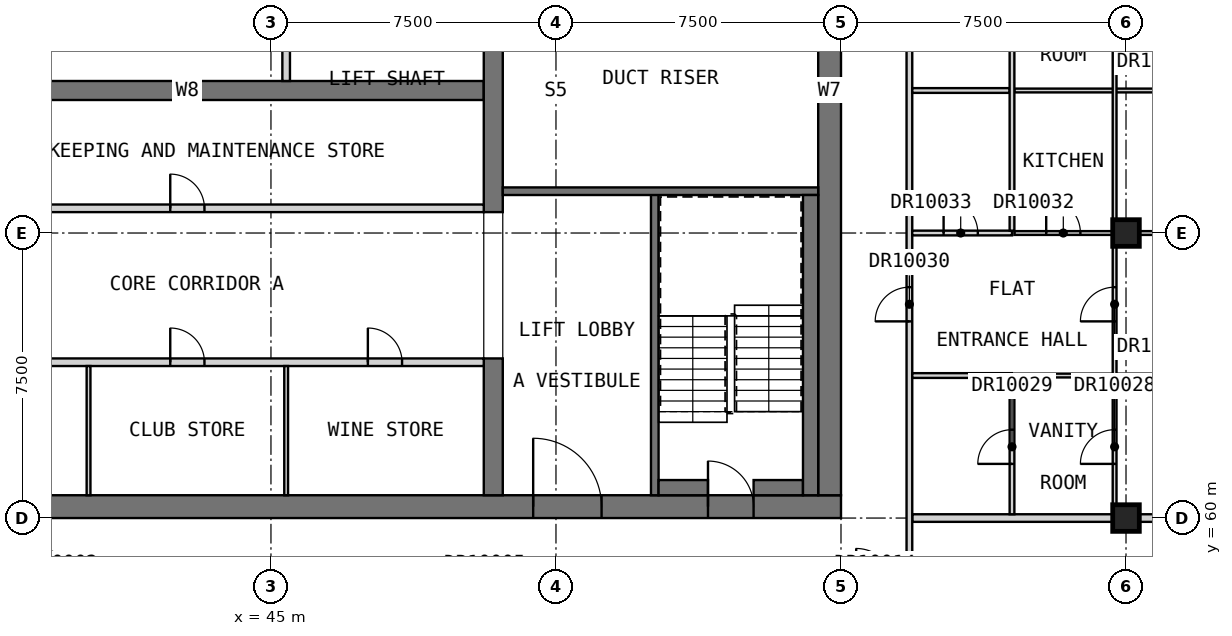
"""IFC4 building model, lengths in metres.
Left out: names, types, materials, properties, quantities, classifications, styles, units other than length and angle.
Written with IfcOpenShell. Run it as: python <this file> out.ifc"""

import sys

from ifc_helpers import new_model, si_unit, direction, frame, frame_2d, origin, origin_2d, place, context, subcontext, project, spatial, rectangle, extrude, element, fill, save


model = new_model("IFC4")
c1 = context("Model", 3, precision=1e-05, world=origin(), true_north=direction((0.0, 1.0)))
c2 = subcontext(c1, "Body", "Model", "MODEL_VIEW")
j1 = project(units=[si_unit("LENGTHUNIT", "METRE"), si_unit("PLANEANGLEUNIT", "RADIAN")], contexts=[c1])
p1 = place(None, origin())
s1 = spatial("IfcSite", under=j1, at=p1, CompositionType="ELEMENT")
p2 = place(p1, origin())
s2 = spatial("IfcBuilding", under=s1, at=p2, CompositionType="ELEMENT")
p3 = place(p2, frame((0.0, 0.0, 283.7)))
s3 = spatial("IfcBuildingStorey", under=s2, at=p3, CompositionType="ELEMENT", Elevation=283.7)
for number, where, z_axis, x_axis in (
    (1, (67.5, 60.0, 0.0), (0.0, 0.0, 1.0), (1.0, 0.0, 0.0)),
    (2, (67.5, 67.5, 0.0), (0.0, 0.0, 1.0), (1.0, 0.0, 0.0)),
):
    element("IfcColumn", number, at=place(p3, frame(where, z_axis=z_axis, x_axis=x_axis)), inside=s3, PredefinedType="COLUMN", context=c2, shape_type="SweptSolid", body=[
        extrude(rectangle(XDim=0.7, YDim=0.7, at=origin_2d()), origin(), (0.0, 0.0, 1.0), 3.5),
    ])
p4 = place(p3, frame((30.0, 60.3, 0.0), z_axis=(0.0, 0.0, 1.0), x_axis=(1.0, 0.0, 0.0)))
e3 = element("IfcWall", 3, at=p4, inside=s3, PredefinedType="SHEAR", context=c2, shape_type="SweptSolid", body=[
    extrude(rectangle(XDim=30.0, YDim=0.6, at=frame_2d((15.0, 0.0))), origin(), (0.0, 0.0, 1.0), 3.5),
])
p5 = place(p4, frame((21.9, 0.0, 0.0)))
e4 = element("IfcOpeningElement", 4, at=p5, cuts=e3, PredefinedType="OPENING", context=c2, shape_type="SweptSolid", body=[
    extrude(rectangle(XDim=1.8, YDim=2.1, at=frame_2d((0.9, 1.05))), frame((0.0, 0.31, 0.0), z_axis=(0.0, -1.0, 0.0), x_axis=(1.0, 0.0, 0.0)), (0.0, 0.0, 1.0), 0.62),
])
p6 = place(p4, frame((26.5, 0.0, 0.0)))
e5 = element("IfcOpeningElement", 5, at=p6, cuts=e3, PredefinedType="OPENING", context=c2, shape_type="SweptSolid", body=[
    extrude(rectangle(XDim=1.2, YDim=2.1, at=frame_2d((0.6, 1.05))), frame((0.0, 0.31, 0.0), z_axis=(0.0, -1.0, 0.0), x_axis=(1.0, 0.0, 0.0)), (0.0, 0.0, 1.0), 0.62),
])
p7 = place(p3, frame((59.7, 60.6, 0.0), z_axis=(0.0, 0.0, 1.0), x_axis=(0.0, 1.0, 0.0)))
e6 = element("IfcWall", 6, at=p7, inside=s3, PredefinedType="SHEAR", context=c2, shape_type="SweptSolid", body=[
    extrude(rectangle(XDim=21.3, YDim=0.6, at=frame_2d((10.65, 0.0))), origin(), (0.0, 0.0, 1.0), 3.5),
])
p8 = place(p7, frame((14.9, 0.0, 0.0)))
e7 = element("IfcOpeningElement", 7, at=p8, cuts=e6, PredefinedType="OPENING", context=c2, shape_type="SweptSolid", body=[
    extrude(rectangle(XDim=1.8, YDim=2.1, at=frame_2d((0.9, 1.05))), frame((0.0, 0.31, 0.0), z_axis=(0.0, -1.0, 0.0), x_axis=(1.0, 0.0, 0.0)), (0.0, 0.0, 1.0), 0.62),
])
p9 = place(p3, frame((35.0, 71.25, 0.0), z_axis=(0.0, 0.0, 1.0), x_axis=(1.0, 0.0, 0.0)))
e8 = element("IfcWall", 8, at=p9, inside=s3, PredefinedType="SHEAR", context=c2, shape_type="SweptSolid", body=[
    extrude(rectangle(XDim=15.6, YDim=0.5, at=frame_2d((7.8, 0.0))), origin(), (0.0, 0.0, 1.0), 3.5),
])
p10 = place(p3, frame((50.85, 60.6, 0.0), z_axis=(0.0, 0.0, 1.0), x_axis=(0.0, 1.0, 0.0)))
e9 = element("IfcWall", 9, at=p10, inside=s3, PredefinedType="SHEAR", context=c2, shape_type="SweptSolid", body=[
    extrude(rectangle(XDim=3.6, YDim=0.5, at=frame_2d((1.8, 0.0))), origin(), (0.0, 0.0, 1.0), 3.5),
])
p11 = place(p3, frame((50.85, 68.05, 0.0), z_axis=(0.0, 0.0, 1.0), x_axis=(0.0, 1.0, 0.0)))
e10 = element("IfcWall", 10, at=p11, inside=s3, PredefinedType="SHEAR", context=c2, shape_type="SweptSolid", body=[
    extrude(rectangle(XDim=6.4, YDim=0.5, at=frame_2d((3.2, 0.0))), origin(), (0.0, 0.0, 1.0), 3.5),
])
p12 = place(p3, frame((35.0, 64.1, 0.0), z_axis=(0.0, 0.0, 1.0), x_axis=(1.0, 0.0, 0.0)))
e11 = element("IfcWall", 11, at=p12, inside=s3, PredefinedType="PARTITIONING", context=c2, shape_type="SweptSolid", body=[
    extrude(rectangle(XDim=15.6, YDim=0.2, at=frame_2d((7.8, 0.0))), origin(), (0.0, 0.0, 1.0), 3.2),
])
p13 = place(p12, frame((2.15, 0.0, 0.0)))
e12 = element("IfcOpeningElement", 12, at=p13, cuts=e11, PredefinedType="OPENING", context=c2, shape_type="SweptSolid", body=[
    extrude(rectangle(XDim=0.9, YDim=2.1, at=frame_2d((0.45, 1.05))), frame((0.0, 0.11, 0.0), z_axis=(0.0, -1.0, 0.0), x_axis=(1.0, 0.0, 0.0)), (0.0, 0.0, 1.0), 0.22),
])
p14 = place(p12, frame((7.35, 0.0, 0.0)))
e13 = element("IfcOpeningElement", 13, at=p14, cuts=e11, PredefinedType="OPENING", context=c2, shape_type="SweptSolid", body=[
    extrude(rectangle(XDim=0.9, YDim=2.1, at=frame_2d((0.45, 1.05))), frame((0.0, 0.11, 0.0), z_axis=(0.0, -1.0, 0.0), x_axis=(1.0, 0.0, 0.0)), (0.0, 0.0, 1.0), 0.22),
])
p15 = place(p12, frame((12.55, 0.0, 0.0)))
e14 = element("IfcOpeningElement", 14, at=p15, cuts=e11, PredefinedType="OPENING", context=c2, shape_type="SweptSolid", body=[
    extrude(rectangle(XDim=0.9, YDim=2.1, at=frame_2d((0.45, 1.05))), frame((0.0, 0.11, 0.0), z_axis=(0.0, -1.0, 0.0), x_axis=(1.0, 0.0, 0.0)), (0.0, 0.0, 1.0), 0.22),
])
for number, where, z_axis, x_axis in (
    (15, (40.2, 60.6, 0.0), (0.0, 0.0, 1.0), (0.0, 1.0, 0.0)),
    (16, (45.4, 60.6, 0.0), (0.0, 0.0, 1.0), (0.0, 1.0, 0.0)),
):
    element("IfcWall", number, at=place(p3, frame(where, z_axis=z_axis, x_axis=x_axis)), inside=s3, PredefinedType="PARTITIONING", context=c2, shape_type="SweptSolid", body=[
        extrude(rectangle(XDim=3.4, YDim=0.1, at=frame_2d((1.7, 0.0))), origin(), (0.0, 0.0, 1.0), 3.2),
    ])
p16 = place(p3, frame((35.0, 68.15, 0.0), z_axis=(0.0, 0.0, 1.0), x_axis=(1.0, 0.0, 0.0)))
e17 = element("IfcWall", 17, at=p16, inside=s3, PredefinedType="PARTITIONING", context=c2, shape_type="SweptSolid", body=[
    extrude(rectangle(XDim=15.6, YDim=0.2, at=frame_2d((7.8, 0.0))), origin(), (0.0, 0.0, 1.0), 3.2),
])
p17 = place(p16, frame((7.35, 0.0, 0.0)))
e18 = element("IfcOpeningElement", 18, at=p17, cuts=e17, PredefinedType="OPENING", context=c2, shape_type="SweptSolid", body=[
    extrude(rectangle(XDim=0.9, YDim=2.1, at=frame_2d((0.45, 1.05))), frame((0.0, 0.11, 0.0), z_axis=(0.0, -1.0, 0.0), x_axis=(1.0, 0.0, 0.0)), (0.0, 0.0, 1.0), 0.22),
])
p18 = place(p3, frame((45.4, 71.5, 0.0), z_axis=(0.0, 0.0, 1.0), x_axis=(0.0, 1.0, 0.0)))
e19 = element("IfcWall", 19, at=p18, inside=s3, PredefinedType="SOLIDWALL", context=c2, shape_type="SweptSolid", body=[
    extrude(rectangle(XDim=2.0, YDim=0.2, at=frame_2d((1.0, 0.0))), origin(), (0.0, 0.0, 1.0), 3.5),
])
p19 = place(p3, frame((55.1, 60.6, 0.0), z_axis=(0.0, 0.0, 1.0), x_axis=(0.0, 1.0, 0.0)))
e20 = element("IfcWall", 20, at=p19, inside=s3, PredefinedType="SOLIDWALL", context=c2, shape_type="SweptSolid", body=[
    extrude(rectangle(XDim=8.0, YDim=0.2, at=frame_2d((4.0, 0.0))), origin(), (0.0, 0.0, 1.0), 3.2),
])
p20 = place(p3, frame((51.1, 68.6, 0.0), z_axis=(0.0, 0.0, 1.0), x_axis=(1.0, 0.0, 0.0)))
e21 = element("IfcWall", 21, at=p20, inside=s3, PredefinedType="SOLIDWALL", context=c2, shape_type="SweptSolid", body=[
    extrude(rectangle(XDim=8.3, YDim=0.2, at=frame_2d((4.15, 0.0))), origin(), (0.0, 0.0, 1.0), 3.2),
])
for number, where, z_axis, x_axis in (
    (22, (55.2, 60.8, 0.0), (0.0, 0.0, 1.0), (1.0, 0.0, 0.0)),
    (23, (57.7, 60.8, 0.0), (0.0, 0.0, 1.0), (1.0, 0.0, 0.0)),
):
    element("IfcWall", number, at=place(p3, frame(where, z_axis=z_axis, x_axis=x_axis)), inside=s3, PredefinedType="SOLIDWALL", context=c2, shape_type="SweptSolid", body=[
        extrude(rectangle(XDim=1.3, YDim=0.4, at=frame_2d((0.65, 0.0))), origin(), (0.0, 0.0, 1.0), 3.2),
    ])
p21 = place(p3, frame((59.2, 60.6, 0.0), z_axis=(0.0, 0.0, 1.0), x_axis=(0.0, 1.0, 0.0)))
e24 = element("IfcWall", 24, at=p21, inside=s3, PredefinedType="SOLIDWALL", context=c2, shape_type="SweptSolid", body=[
    extrude(rectangle(XDim=7.9, YDim=0.4, at=frame_2d((3.95, 0.0))), origin(), (0.0, 0.0, 1.0), 3.2),
])
p22 = place(p3, frame((61.875, 60.0, 0.0), z_axis=(0.0, 0.0, 1.0), x_axis=(1.0, 0.0, 0.0)))
e25 = element("IfcWall", 25, at=p22, inside=s3, PredefinedType="PARTITIONING", context=c2, shape_type="SweptSolid", body=[
    extrude(rectangle(XDim=13.125, YDim=0.2, at=frame_2d((6.562, 0.0))), origin(), (0.0, 0.0, 1.0), 3.2),
])
p23 = place(p3, frame((61.8, 58.275, 0.0), z_axis=(0.0, 0.0, 1.0), x_axis=(0.0, 1.0, 0.0)))
e26 = element("IfcWall", 26, at=p23, inside=s3, PredefinedType="PARTITIONING", context=c2, shape_type="SweptSolid", body=[
    extrude(rectangle(XDim=25.95, YDim=0.15, at=frame_2d((12.975, 0.0))), origin(), (0.0, 0.0, 1.0), 3.2),
])
p24 = place(p23, frame((6.9, 0.0, 0.0)))
e27 = element("IfcOpeningElement", 27, at=p24, cuts=e26, PredefinedType="OPENING", context=c2, shape_type="SweptSolid", body=[
    extrude(rectangle(XDim=0.9, YDim=2.1, at=frame_2d((0.45, 1.05))), frame((0.0, 0.085, 0.0), z_axis=(0.0, -1.0, 0.0), x_axis=(1.0, 0.0, 0.0)), (0.0, 0.0, 1.0), 0.17),
])
p25 = place(p23, frame((18.15, 0.0, 0.0)))
e28 = element("IfcOpeningElement", 28, at=p25, cuts=e26, PredefinedType="OPENING", context=c2, shape_type="SweptSolid", body=[
    extrude(rectangle(XDim=0.9, YDim=2.1, at=frame_2d((0.45, 1.05))), frame((0.0, 0.085, 0.0), z_axis=(0.0, -1.0, 0.0), x_axis=(1.0, 0.0, 0.0)), (0.0, 0.0, 1.0), 0.17),
])
p26 = place(p3, frame((64.562, 63.75, 0.0), z_axis=(0.0, 0.0, 1.0), x_axis=(1.0, 0.0, 0.0)))
e29 = element("IfcWall", 29, at=p26, inside=s3, PredefinedType="PARTITIONING", context=c2, shape_type="SweptSolid", body=[
    extrude(rectangle(XDim=9.627, YDim=0.1, at=frame_2d((4.814, 0.0))), origin(), (0.0, 0.0, 1.0), 3.2),
])
p27 = place(p26, frame((6.087, 0.0, 0.0)))
e30 = element("IfcOpeningElement", 30, at=p27, cuts=e29, PredefinedType="OPENING", context=c2, shape_type="SweptSolid", body=[
    extrude(rectangle(XDim=0.9, YDim=2.1, at=frame_2d((0.45, 1.05))), frame((0.0, 0.06, 0.0), z_axis=(0.0, -1.0, 0.0), x_axis=(1.0, 0.0, 0.0)), (0.0, 0.0, 1.0), 0.12),
])
p28 = place(p3, frame((64.562, 67.5, 0.0), z_axis=(0.0, 0.0, 1.0), x_axis=(1.0, 0.0, 0.0)))
e31 = element("IfcWall", 31, at=p28, inside=s3, PredefinedType="PARTITIONING", context=c2, shape_type="SweptSolid", body=[
    extrude(rectangle(XDim=10.438, YDim=0.1, at=frame_2d((5.219, 0.0))), origin(), (0.0, 0.0, 1.0), 3.2),
])
p29 = place(p28, frame((0.837, 0.0, 0.0)))
e32 = element("IfcOpeningElement", 32, at=p29, cuts=e31, PredefinedType="OPENING", context=c2, shape_type="SweptSolid", body=[
    extrude(rectangle(XDim=0.9, YDim=2.1, at=frame_2d((0.45, 1.05))), frame((0.0, 0.06, 0.0), z_axis=(0.0, -1.0, 0.0), x_axis=(1.0, 0.0, 0.0)), (0.0, 0.0, 1.0), 0.12),
])
p30 = place(p28, frame((6.087, 0.0, 0.0)))
e33 = element("IfcOpeningElement", 33, at=p30, cuts=e31, PredefinedType="OPENING", context=c2, shape_type="SweptSolid", body=[
    extrude(rectangle(XDim=0.9, YDim=2.1, at=frame_2d((0.45, 1.05))), frame((0.0, 0.06, 0.0), z_axis=(0.0, -1.0, 0.0), x_axis=(1.0, 0.0, 0.0)), (0.0, 0.0, 1.0), 0.12),
])
p31 = place(p3, frame((64.562, 71.25, 0.0), z_axis=(0.0, 0.0, 1.0), x_axis=(1.0, 0.0, 0.0)))
e34 = element("IfcWall", 34, at=p31, inside=s3, PredefinedType="PARTITIONING", context=c2, shape_type="SweptSolid", body=[
    extrude(rectangle(XDim=9.627, YDim=0.1, at=frame_2d((4.814, 0.0))), origin(), (0.0, 0.0, 1.0), 3.2),
])
p32 = place(p31, frame((6.087, 0.0, 0.0)))
e35 = element("IfcOpeningElement", 35, at=p32, cuts=e34, PredefinedType="OPENING", context=c2, shape_type="SweptSolid", body=[
    extrude(rectangle(XDim=0.9, YDim=2.1, at=frame_2d((0.45, 1.05))), frame((0.0, 0.06, 0.0), z_axis=(0.0, -1.0, 0.0), x_axis=(1.0, 0.0, 0.0)), (0.0, 0.0, 1.0), 0.12),
])
p33 = place(p3, frame((67.2, 60.1, 0.0), z_axis=(0.0, 0.0, 1.0), x_axis=(0.0, 1.0, 0.0)))
e36 = element("IfcWall", 36, at=p33, inside=s3, PredefinedType="PARTITIONING", context=c2, shape_type="SweptSolid", body=[
    extrude(rectangle(XDim=22.3, YDim=0.1, at=frame_2d((11.15, 0.0))), origin(), (0.0, 0.0, 1.0), 3.2),
])
p34 = place(p33, frame((1.325, 0.0, 0.0)))
e37 = element("IfcOpeningElement", 37, at=p34, cuts=e36, PredefinedType="OPENING", context=c2, shape_type="SweptSolid", body=[
    extrude(rectangle(XDim=0.9, YDim=2.1, at=frame_2d((0.45, 1.05))), frame((0.0, 0.06, 0.0), z_axis=(0.0, -1.0, 0.0), x_axis=(1.0, 0.0, 0.0)), (0.0, 0.0, 1.0), 0.12),
])
p35 = place(p33, frame((5.075, 0.0, 0.0)))
e38 = element("IfcOpeningElement", 38, at=p35, cuts=e36, PredefinedType="OPENING", context=c2, shape_type="SweptSolid", body=[
    extrude(rectangle(XDim=0.9, YDim=2.1, at=frame_2d((0.45, 1.05))), frame((0.0, 0.06, 0.0), z_axis=(0.0, -1.0, 0.0), x_axis=(1.0, 0.0, 0.0)), (0.0, 0.0, 1.0), 0.12),
])
p36 = place(p33, frame((12.575, 0.0, 0.0)))
e39 = element("IfcOpeningElement", 39, at=p36, cuts=e36, PredefinedType="OPENING", context=c2, shape_type="SweptSolid", body=[
    extrude(rectangle(XDim=0.9, YDim=2.1, at=frame_2d((0.45, 1.05))), frame((0.0, 0.06, 0.0), z_axis=(0.0, -1.0, 0.0), x_axis=(1.0, 0.0, 0.0)), (0.0, 0.0, 1.0), 0.12),
])
p37 = place(p33, frame((16.325, 0.0, 0.0)))
e40 = element("IfcOpeningElement", 40, at=p37, cuts=e36, PredefinedType="OPENING", context=c2, shape_type="SweptSolid", body=[
    extrude(rectangle(XDim=0.9, YDim=2.1, at=frame_2d((0.45, 1.05))), frame((0.0, 0.06, 0.0), z_axis=(0.0, -1.0, 0.0), x_axis=(1.0, 0.0, 0.0)), (0.0, 0.0, 1.0), 0.12),
])
p38 = place(p3, frame((61.875, 63.75, 0.0), z_axis=(0.0, 0.0, 1.0), x_axis=(1.0, 0.0, 0.0)))
e41 = element("IfcWall", 41, at=p38, inside=s3, PredefinedType="PARTITIONING", context=c2, shape_type="SweptSolid", body=[
    extrude(rectangle(XDim=2.625, YDim=0.125, at=frame_2d((1.312, 0.0))), origin(), (0.0, 0.0, 1.0), 3.2),
])
p39 = place(p3, frame((61.875, 67.5, 0.0), z_axis=(0.0, 0.0, 1.0), x_axis=(1.0, 0.0, 0.0)))
e42 = element("IfcWall", 42, at=p39, inside=s3, PredefinedType="PARTITIONING", context=c2, shape_type="SweptSolid", body=[
    extrude(rectangle(XDim=2.625, YDim=0.125, at=frame_2d((1.312, 0.0))), origin(), (0.0, 0.0, 1.0), 3.2),
])
p40 = place(p39, frame((0.825, 0.0, 0.0)))
e43 = element("IfcOpeningElement", 43, at=p40, cuts=e42, PredefinedType="OPENING", context=c2, shape_type="SweptSolid", body=[
    extrude(rectangle(XDim=0.9, YDim=2.1, at=frame_2d((0.45, 1.05))), frame((0.0, 0.073, 0.0), z_axis=(0.0, -1.0, 0.0), x_axis=(1.0, 0.0, 0.0)), (0.0, 0.0, 1.0), 0.145),
])
p41 = place(p3, frame((61.875, 71.25, 0.0), z_axis=(0.0, 0.0, 1.0), x_axis=(1.0, 0.0, 0.0)))
e44 = element("IfcWall", 44, at=p41, inside=s3, PredefinedType="PARTITIONING", context=c2, shape_type="SweptSolid", body=[
    extrude(rectangle(XDim=2.562, YDim=0.125, at=frame_2d((1.281, 0.0))), origin(), (0.0, 0.0, 1.0), 3.2),
])
p42 = place(p3, frame((64.5, 60.1, 0.0), z_axis=(0.0, 0.0, 1.0), x_axis=(0.0, 1.0, 0.0)))
e45 = element("IfcWall", 45, at=p42, inside=s3, PredefinedType="PARTITIONING", context=c2, shape_type="SweptSolid", body=[
    extrude(rectangle(XDim=3.587, YDim=0.125, at=frame_2d((1.794, 0.0))), origin(), (0.0, 0.0, 1.0), 3.2),
])
p43 = place(p42, frame((1.325, 0.0, 0.0)))
e46 = element("IfcOpeningElement", 46, at=p43, cuts=e45, PredefinedType="OPENING", context=c2, shape_type="SweptSolid", body=[
    extrude(rectangle(XDim=0.9, YDim=2.1, at=frame_2d((0.45, 1.05))), frame((0.0, 0.073, 0.0), z_axis=(0.0, -1.0, 0.0), x_axis=(1.0, 0.0, 0.0)), (0.0, 0.0, 1.0), 0.145),
])
p44 = place(p3, frame((64.5, 67.562, 0.0), z_axis=(0.0, 0.0, 1.0), x_axis=(0.0, 1.0, 0.0)))
e47 = element("IfcWall", 47, at=p44, inside=s3, PredefinedType="PARTITIONING", context=c2, shape_type="SweptSolid", body=[
    extrude(rectangle(XDim=7.337, YDim=0.125, at=frame_2d((3.669, 0.0))), origin(), (0.0, 0.0, 1.0), 3.2),
])
p45 = place(p44, frame((5.113, 0.0, 0.0)))
e48 = element("IfcOpeningElement", 48, at=p45, cuts=e47, PredefinedType="OPENING", context=c2, shape_type="SweptSolid", body=[
    extrude(rectangle(XDim=0.9, YDim=2.1, at=frame_2d((0.45, 1.05))), frame((0.0, 0.073, 0.0), z_axis=(0.0, -1.0, 0.0), x_axis=(1.0, 0.0, 0.0)), (0.0, 0.0, 1.0), 0.145),
])
p46 = place(p14, origin())
e49 = element("IfcDoor", 49, at=p46, inside=s3, OperationType="SINGLE_SWING_RIGHT", PredefinedType="DOOR", context=c2, shape_type="SweptSolid", body=[
    extrude(rectangle(XDim=0.9, YDim=2.1, at=frame_2d((0.45, 1.05))), frame((0.0, 0.025, 0.0), z_axis=(0.0, -1.0, 0.0), x_axis=(1.0, 0.0, 0.0)), (0.0, 0.0, 1.0), 0.05),
])
fill(e13, e49)
p47 = place(p15, origin())
e50 = element("IfcDoor", 50, at=p47, inside=s3, OperationType="SINGLE_SWING_LEFT", PredefinedType="DOOR", context=c2, shape_type="SweptSolid", body=[
    extrude(rectangle(XDim=0.9, YDim=2.1, at=frame_2d((0.45, 1.05))), frame((0.0, 0.025, 0.0), z_axis=(0.0, -1.0, 0.0), x_axis=(1.0, 0.0, 0.0)), (0.0, 0.0, 1.0), 0.05),
])
fill(e14, e50)
p48 = place(p17, origin())
e51 = element("IfcDoor", 51, at=p48, inside=s3, OperationType="SINGLE_SWING_LEFT", PredefinedType="DOOR", context=c2, shape_type="SweptSolid", body=[
    extrude(rectangle(XDim=0.9, YDim=2.1, at=frame_2d((0.45, 1.05))), frame((0.0, 0.025, 0.0), z_axis=(0.0, -1.0, 0.0), x_axis=(1.0, 0.0, 0.0)), (0.0, 0.0, 1.0), 0.05),
])
fill(e18, e51)
p49 = place(p5, origin())
e52 = element("IfcDoor", 52, at=p49, inside=s3, OperationType="DOUBLE_DOOR_SINGLE_SWING", PredefinedType="DOOR", context=c2, shape_type="SweptSolid", body=[
    extrude(rectangle(XDim=1.8, YDim=2.1, at=frame_2d((0.9, 1.05))), frame((0.0, 0.025, 0.0), z_axis=(0.0, -1.0, 0.0), x_axis=(1.0, 0.0, 0.0)), (0.0, 0.0, 1.0), 0.05),
])
fill(e4, e52)
p50 = place(p6, origin())
e53 = element("IfcDoor", 53, at=p50, inside=s3, OperationType="SINGLE_SWING_LEFT", PredefinedType="DOOR", context=c2, shape_type="SweptSolid", body=[
    extrude(rectangle(XDim=1.2, YDim=2.1, at=frame_2d((0.6, 1.05))), frame((0.0, 0.025, 0.0), z_axis=(0.0, -1.0, 0.0), x_axis=(1.0, 0.0, 0.0)), (0.0, 0.0, 1.0), 0.05),
])
fill(e5, e53)
p51 = place(p34, origin())
e54 = element("IfcDoor", 54, at=p51, inside=s3, OperationType="SINGLE_SWING_LEFT", PredefinedType="DOOR", context=c2, shape_type="SweptSolid", body=[
    extrude(rectangle(XDim=0.9, YDim=2.1, at=frame_2d((0.45, 1.05))), frame((0.0, 0.025, 0.0), z_axis=(0.0, -1.0, 0.0), x_axis=(1.0, 0.0, 0.0)), (0.0, 0.0, 1.0), 0.05),
])
fill(e37, e54)
p52 = place(p43, origin())
e55 = element("IfcDoor", 55, at=p52, inside=s3, OperationType="SINGLE_SWING_LEFT", PredefinedType="DOOR", context=c2, shape_type="SweptSolid", body=[
    extrude(rectangle(XDim=0.9, YDim=2.1, at=frame_2d((0.45, 1.05))), frame((0.0, 0.025, 0.0), z_axis=(0.0, -1.0, 0.0), x_axis=(1.0, 0.0, 0.0)), (0.0, 0.0, 1.0), 0.05),
])
fill(e46, e55)
p53 = place(p24, origin())
e56 = element("IfcDoor", 56, at=p53, inside=s3, OperationType="SINGLE_SWING_RIGHT", PredefinedType="DOOR", context=c2, shape_type="SweptSolid", body=[
    extrude(rectangle(XDim=0.9, YDim=2.1, at=frame_2d((0.45, 1.05))), frame((0.0, 0.025, 0.0), z_axis=(0.0, -1.0, 0.0), x_axis=(1.0, 0.0, 0.0)), (0.0, 0.0, 1.0), 0.05),
])
fill(e27, e56)
p54 = place(p35, origin())
e57 = element("IfcDoor", 57, at=p54, inside=s3, OperationType="SINGLE_SWING_LEFT", PredefinedType="DOOR", context=c2, shape_type="SweptSolid", body=[
    extrude(rectangle(XDim=0.9, YDim=2.1, at=frame_2d((0.45, 1.05))), frame((0.0, 0.025, 0.0), z_axis=(0.0, -1.0, 0.0), x_axis=(1.0, 0.0, 0.0)), (0.0, 0.0, 1.0), 0.05),
])
fill(e38, e57)
p55 = place(p29, origin())
e58 = element("IfcDoor", 58, at=p55, inside=s3, OperationType="SINGLE_SWING_LEFT", PredefinedType="DOOR", context=c2, shape_type="SweptSolid", body=[
    extrude(rectangle(XDim=0.9, YDim=2.1, at=frame_2d((0.45, 1.05))), frame((0.0, 0.025, 0.0), z_axis=(0.0, -1.0, 0.0), x_axis=(1.0, 0.0, 0.0)), (0.0, 0.0, 1.0), 0.05),
])
fill(e32, e58)
p56 = place(p40, origin())
e59 = element("IfcDoor", 59, at=p56, inside=s3, OperationType="SINGLE_SWING_LEFT", PredefinedType="DOOR", context=c2, shape_type="SweptSolid", body=[
    extrude(rectangle(XDim=0.9, YDim=2.1, at=frame_2d((0.45, 1.05))), frame((0.0, 0.025, 0.0), z_axis=(0.0, -1.0, 0.0), x_axis=(1.0, 0.0, 0.0)), (0.0, 0.0, 1.0), 0.05),
])
fill(e43, e59)
save(model, sys.argv[1])
